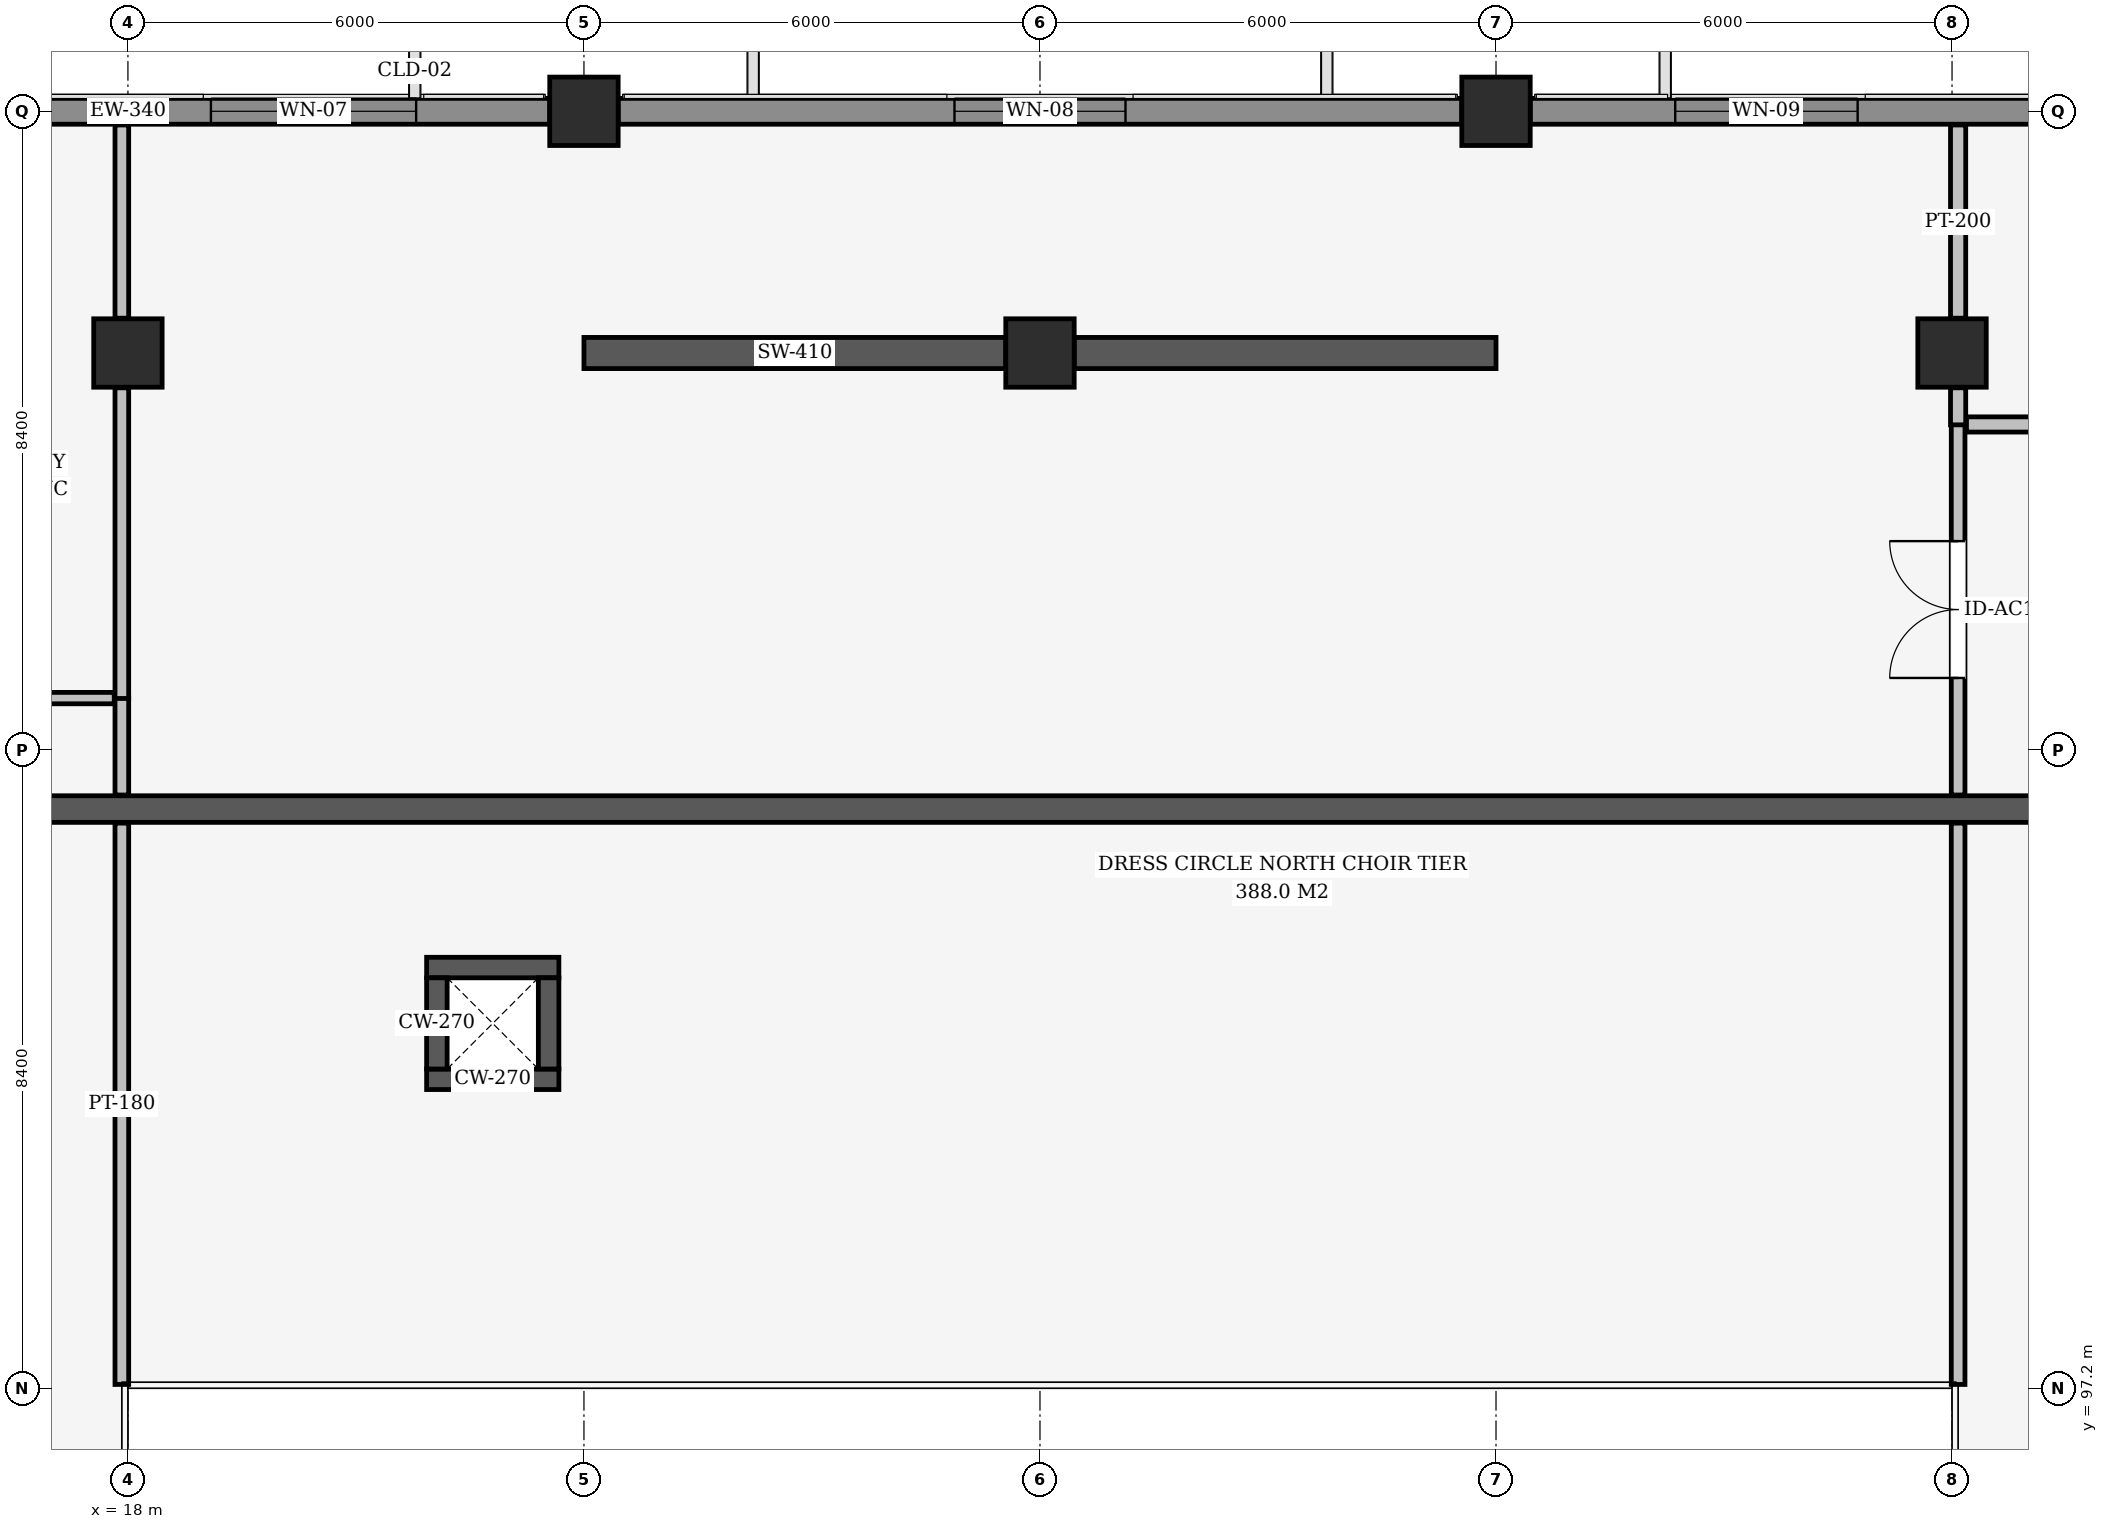
"""IFC4 building model, lengths in metres.
Left out: names, types, materials, properties, quantities, classifications, styles, units other than length and angle.
Written with IfcOpenShell. Run it as: python <this file> out.ifc"""

import sys

from ifc_helpers import new_model, si_unit, direction, frame, frame_2d, origin, origin_2d, place, context, subcontext, project, spatial, rectangle, extrude, element, fill, save


model = new_model("IFC4")
c1 = context("Model", 3, precision=1e-05, world=origin(), true_north=direction((0.0, 1.0)))
c2 = subcontext(c1, "Body", "Model", "MODEL_VIEW")
j1 = project(units=[si_unit("LENGTHUNIT", "METRE"), si_unit("PLANEANGLEUNIT", "RADIAN")], contexts=[c1])
p1 = place(None, origin())
s1 = spatial("IfcSite", under=j1, at=p1, CompositionType="ELEMENT")
p2 = place(p1, origin())
s2 = spatial("IfcBuilding", under=s1, at=p2, CompositionType="ELEMENT")
p3 = place(p2, frame((0.0, 0.0, 4.8)))
s3 = spatial("IfcBuildingStorey", under=s2, at=p3, CompositionType="ELEMENT", Elevation=4.8)
for number, where, z_axis, x_axis in (
    (1, (24.0, 114.0, 0.0), (0.0, 0.0, 1.0), (1.0, 0.0, 0.0)),
    (2, (36.0, 114.0, 0.0), (0.0, 0.0, 1.0), (1.0, 0.0, 0.0)),
    (3, (18.0, 110.82, 0.0), (0.0, 0.0, 1.0), (1.0, 0.0, 0.0)),
    (4, (30.0, 110.82, 0.0), (0.0, 0.0, 1.0), (1.0, 0.0, 0.0)),
    (5, (42.0, 110.82, 0.0), (0.0, 0.0, 1.0), (1.0, 0.0, 0.0)),
):
    element("IfcColumn", number, at=place(p3, frame(where, z_axis=z_axis, x_axis=x_axis)), inside=s3, PredefinedType="COLUMN", context=c2, shape_type="SweptSolid", body=[
        extrude(rectangle(XDim=0.9, YDim=0.9, at=origin_2d()), origin(), (0.0, 0.0, 1.0), 4.5),
    ])
p4 = place(p3, frame((12.005, 104.82, 0.0), z_axis=(0.0, 0.0, 1.0), x_axis=(1.0, 0.0, 0.0)))
e6 = element("IfcWall", 6, at=p4, inside=s3, PredefinedType="SHEAR", context=c2, shape_type="SweptSolid", body=[
    extrude(rectangle(XDim=35.99, YDim=0.35, at=frame_2d((17.995, 0.0))), origin(), (0.0, 0.0, 1.0), 4.2),
])
for number, where, z_axis, x_axis in (
    (7, (24.0, 110.82, 0.0), (0.0, 0.0, 1.0), (1.0, 0.0, 0.0)),
    (8, (30.45, 110.82, 0.0), (0.0, 0.0, 1.0), (1.0, 0.0, 0.0)),
):
    element("IfcWall", number, at=place(p3, frame(where, z_axis=z_axis, x_axis=x_axis)), inside=s3, PredefinedType="SHEAR", context=c2, shape_type="SweptSolid", body=[
        extrude(rectangle(XDim=5.55, YDim=0.41, at=frame_2d((2.775, 0.0))), origin(), (0.0, 0.0, 1.0), 3.505),
    ])
p5 = place(p3, frame((12.45, 114.0, 0.0), z_axis=(0.0, 0.0, 1.0), x_axis=(1.0, 0.0, 0.0)))
e9 = element("IfcWall", 9, at=p5, inside=s3, PredefinedType="SOLIDWALL", context=c2, shape_type="SweptSolid", body=[
    extrude(rectangle(XDim=11.1, YDim=0.34, at=frame_2d((5.55, 0.0))), origin(), (0.0, 0.0, 1.0), 3.487),
])
p6 = place(p5, frame((6.642, 0.0, 0.85)))
e10 = element("IfcOpeningElement", 10, at=p6, cuts=e9, PredefinedType="OPENING", context=c2, shape_type="SweptSolid", body=[
    extrude(rectangle(XDim=2.7, YDim=1.95, at=frame_2d((1.35, 0.975))), frame((0.0, 0.18, 0.0), z_axis=(0.0, -1.0, 0.0), x_axis=(1.0, 0.0, 0.0)), (0.0, 0.0, 1.0), 0.36),
])
p7 = place(p3, frame((24.45, 114.0, 0.0), z_axis=(0.0, 0.0, 1.0), x_axis=(1.0, 0.0, 0.0)))
e11 = element("IfcWall", 11, at=p7, inside=s3, PredefinedType="SOLIDWALL", context=c2, shape_type="SweptSolid", body=[
    extrude(rectangle(XDim=11.1, YDim=0.34, at=frame_2d((5.55, 0.0))), origin(), (0.0, 0.0, 1.0), 3.487),
])
p8 = place(p7, frame((4.425, 0.0, 0.85)))
e12 = element("IfcOpeningElement", 12, at=p8, cuts=e11, PredefinedType="OPENING", context=c2, shape_type="SweptSolid", body=[
    extrude(rectangle(XDim=2.25, YDim=1.95, at=frame_2d((1.125, 0.975))), frame((0.0, 0.18, 0.0), z_axis=(0.0, -1.0, 0.0), x_axis=(1.0, 0.0, 0.0)), (0.0, 0.0, 1.0), 0.36),
])
p9 = place(p3, frame((36.45, 114.0, 0.0), z_axis=(0.0, 0.0, 1.0), x_axis=(1.0, 0.0, 0.0)))
e13 = element("IfcWall", 13, at=p9, inside=s3, PredefinedType="SOLIDWALL", context=c2, shape_type="SweptSolid", body=[
    extrude(rectangle(XDim=11.1, YDim=0.34, at=frame_2d((5.55, 0.0))), origin(), (0.0, 0.0, 1.0), 3.487),
])
p10 = place(p9, frame((1.908, 0.0, 0.85)))
e14 = element("IfcOpeningElement", 14, at=p10, cuts=e13, PredefinedType="OPENING", context=c2, shape_type="SweptSolid", body=[
    extrude(rectangle(XDim=2.4, YDim=0.95, at=frame_2d((1.2, 0.475))), frame((0.0, 0.18, 0.0), z_axis=(0.0, -1.0, 0.0), x_axis=(1.0, 0.0, 0.0)), (0.0, 0.0, 1.0), 0.36),
])
for number, where, z_axis, x_axis in (
    (15, (21.93, 101.265, 0.0), (0.0, 0.0, 1.0), (1.0, 0.0, 0.0)),
    (16, (21.93, 102.735, 0.0), (0.0, 0.0, 1.0), (1.0, 0.0, 0.0)),
):
    element("IfcWall", number, at=place(p3, frame(where, z_axis=z_axis, x_axis=x_axis)), inside=s3, PredefinedType="SHEAR", context=c2, shape_type="SweptSolid", body=[
        extrude(rectangle(XDim=1.74, YDim=0.27, at=frame_2d((0.87, 0.0))), origin(), (0.0, 0.0, 1.0), 4.2),
    ])
for number, where, z_axis, x_axis in (
    (17, (22.065, 101.4, 0.0), (0.0, 0.0, 1.0), (0.0, 1.0, 0.0)),
    (18, (23.535, 101.4, 0.0), (0.0, 0.0, 1.0), (0.0, 1.0, 0.0)),
):
    element("IfcWall", number, at=place(p3, frame(where, z_axis=z_axis, x_axis=x_axis)), inside=s3, PredefinedType="SHEAR", context=c2, shape_type="SweptSolid", body=[
        extrude(rectangle(XDim=1.2, YDim=0.27, at=frame_2d((0.6, 0.0))), origin(), (0.0, 0.0, 1.0), 4.2),
    ])
p11 = place(p3, frame((17.92, 97.25, 0.0), z_axis=(0.0, 0.0, 1.0), x_axis=(0.0, 1.0, 0.0)))
e19 = element("IfcWall", 19, at=p11, inside=s3, PredefinedType="PARTITIONING", context=c2, shape_type="SweptSolid", body=[
    extrude(rectangle(XDim=7.385, YDim=0.18, at=frame_2d((3.692, 0.0))), origin(), (0.0, 0.0, 1.0), 4.5),
])
p12 = place(p3, frame((17.92, 105.005, 0.0), z_axis=(0.0, 0.0, 1.0), x_axis=(0.0, 1.0, 0.0)))
e20 = element("IfcWall", 20, at=p12, inside=s3, PredefinedType="PARTITIONING", context=c2, shape_type="SweptSolid", body=[
    extrude(rectangle(XDim=1.28, YDim=0.18, at=frame_2d((0.64, 0.0))), origin(), (0.0, 0.0, 1.0), 4.5),
])
p13 = place(p3, frame((17.92, 106.275, 0.0), z_axis=(0.0, 0.0, 1.0), x_axis=(0.0, 1.0, 0.0)))
e21 = element("IfcWall", 21, at=p13, inside=s3, PredefinedType="PARTITIONING", context=c2, shape_type="SweptSolid", body=[
    extrude(rectangle(XDim=4.087, YDim=0.18, at=frame_2d((2.043, 0.0))), origin(), (0.0, 0.0, 1.0), 4.5),
])
p14 = place(p3, frame((17.92, 111.278, 0.0), z_axis=(0.0, 0.0, 1.0), x_axis=(0.0, 1.0, 0.0)))
e22 = element("IfcWall", 22, at=p14, inside=s3, PredefinedType="PARTITIONING", context=c2, shape_type="SweptSolid", body=[
    extrude(rectangle(XDim=2.542, YDim=0.18, at=frame_2d((1.271, 0.0))), origin(), (0.0, 0.0, 1.0), 4.5),
])
p15 = place(p3, frame((42.08, 97.25, 0.0), z_axis=(0.0, 0.0, 1.0), x_axis=(0.0, 1.0, 0.0)))
e23 = element("IfcWall", 23, at=p15, inside=s3, PredefinedType="PARTITIONING", context=c2, shape_type="SweptSolid", body=[
    extrude(rectangle(XDim=7.385, YDim=0.18, at=frame_2d((3.692, 0.0))), origin(), (0.0, 0.0, 1.0), 4.5),
])
p16 = place(p3, frame((42.08, 105.005, 0.0), z_axis=(0.0, 0.0, 1.0), x_axis=(0.0, 1.0, 0.0)))
e24 = element("IfcWall", 24, at=p16, inside=s3, PredefinedType="PARTITIONING", context=c2, shape_type="SweptSolid", body=[
    extrude(rectangle(XDim=4.88, YDim=0.18, at=frame_2d((2.44, 0.0))), origin(), (0.0, 0.0, 1.0), 4.5),
])
p17 = place(p16, frame((1.54, 0.0, 0.0)))
e25 = element("IfcOpeningElement", 25, at=p17, cuts=e24, PredefinedType="OPENING", context=c2, shape_type="SweptSolid", body=[
    extrude(rectangle(XDim=1.8, YDim=2.38, at=frame_2d((0.9, 1.19))), frame((0.0, 0.1, 0.0), z_axis=(0.0, -1.0, 0.0), x_axis=(1.0, 0.0, 0.0)), (0.0, 0.0, 1.0), 0.2),
])
p18 = place(p3, frame((42.08, 109.875, 0.0), z_axis=(0.0, 0.0, 1.0), x_axis=(0.0, 1.0, 0.0)))
e26 = element("IfcWall", 26, at=p18, inside=s3, PredefinedType="PARTITIONING", context=c2, shape_type="SweptSolid", body=[
    extrude(rectangle(XDim=0.487, YDim=0.2, at=frame_2d((0.244, 0.0))), origin(), (0.0, 0.0, 1.0), 4.5),
])
p19 = place(p3, frame((42.08, 111.278, 0.0), z_axis=(0.0, 0.0, 1.0), x_axis=(0.0, 1.0, 0.0)))
e27 = element("IfcWall", 27, at=p19, inside=s3, PredefinedType="PARTITIONING", context=c2, shape_type="SweptSolid", body=[
    extrude(rectangle(XDim=2.542, YDim=0.2, at=frame_2d((1.271, 0.0))), origin(), (0.0, 0.0, 1.0), 4.5),
])
p20 = place(p3, frame((14.575, 106.28, 0.0), z_axis=(0.0, 0.0, 1.0), x_axis=(1.0, 0.0, 0.0)))
e28 = element("IfcWall", 28, at=p20, inside=s3, PredefinedType="PARTITIONING", context=c2, shape_type="SweptSolid", body=[
    extrude(rectangle(XDim=3.245, YDim=0.15, at=frame_2d((1.623, 0.0))), origin(), (0.0, 0.0, 1.0), 4.18),
])
p21 = place(p20, frame((1.153, 0.0, 0.0)))
e29 = element("IfcOpeningElement", 29, at=p21, cuts=e28, PredefinedType="OPENING", context=c2, shape_type="SweptSolid", body=[
    extrude(rectangle(XDim=0.94, YDim=2.1, at=frame_2d((0.47, 1.05))), frame((0.0, 0.085, 0.0), z_axis=(0.0, -1.0, 0.0), x_axis=(1.0, 0.0, 0.0)), (0.0, 0.0, 1.0), 0.17),
])
p22 = place(p3, frame((42.19, 109.88, 0.0), z_axis=(0.0, 0.0, 1.0), x_axis=(1.0, 0.0, 0.0)))
e30 = element("IfcWall", 30, at=p22, inside=s3, PredefinedType="PARTITIONING", context=c2, shape_type="SweptSolid", body=[
    extrude(rectangle(XDim=17.63, YDim=0.2, at=frame_2d((8.815, 0.0))), origin(), (0.0, 0.0, 1.0), 4.18),
])
p23 = place(p22, frame((3.848, 0.0, 0.0)))
e31 = element("IfcOpeningElement", 31, at=p23, cuts=e30, PredefinedType="OPENING", context=c2, shape_type="SweptSolid", body=[
    extrude(rectangle(XDim=1.1, YDim=2.26, at=frame_2d((0.55, 1.13))), frame((0.0, 0.11, 0.0), z_axis=(0.0, -1.0, 0.0), x_axis=(1.0, 0.0, 0.0)), (0.0, 0.0, 1.0), 0.22),
])
p24 = place(p6, origin())
e32 = element("IfcWindow", 32, at=p24, inside=s3, PartitioningType="SINGLE_PANEL", PredefinedType="WINDOW", context=c2, shape_type="SweptSolid", body=[
    extrude(rectangle(XDim=2.7, YDim=1.95, at=frame_2d((1.35, 0.975))), frame((0.0, 0.03, 0.0), z_axis=(0.0, -1.0, 0.0), x_axis=(1.0, 0.0, 0.0)), (0.0, 0.0, 1.0), 0.06),
])
fill(e10, e32)
p25 = place(p8, origin())
e33 = element("IfcWindow", 33, at=p25, inside=s3, PartitioningType="SINGLE_PANEL", PredefinedType="WINDOW", context=c2, shape_type="SweptSolid", body=[
    extrude(rectangle(XDim=2.25, YDim=1.95, at=frame_2d((1.125, 0.975))), frame((0.0, 0.03, 0.0), z_axis=(0.0, -1.0, 0.0), x_axis=(1.0, 0.0, 0.0)), (0.0, 0.0, 1.0), 0.06),
])
fill(e12, e33)
p26 = place(p10, origin())
e34 = element("IfcWindow", 34, at=p26, inside=s3, PartitioningType="SINGLE_PANEL", PredefinedType="WINDOW", context=c2, shape_type="SweptSolid", body=[
    extrude(rectangle(XDim=2.4, YDim=0.95, at=frame_2d((1.2, 0.475))), frame((0.0, 0.03, 0.0), z_axis=(0.0, -1.0, 0.0), x_axis=(1.0, 0.0, 0.0)), (0.0, 0.0, 1.0), 0.06),
])
fill(e14, e34)
p27 = place(p17, origin())
e35 = element("IfcDoor", 35, at=p27, inside=s3, OperationType="DOUBLE_DOOR_SINGLE_SWING", PredefinedType="DOOR", context=c2, shape_type="SweptSolid", body=[
    extrude(rectangle(XDim=1.8, YDim=2.38, at=frame_2d((0.9, 1.19))), frame((0.0, 0.025, 0.0), z_axis=(0.0, -1.0, 0.0), x_axis=(1.0, 0.0, 0.0)), (0.0, 0.0, 1.0), 0.05),
])
fill(e25, e35)
save(model, sys.argv[1])
